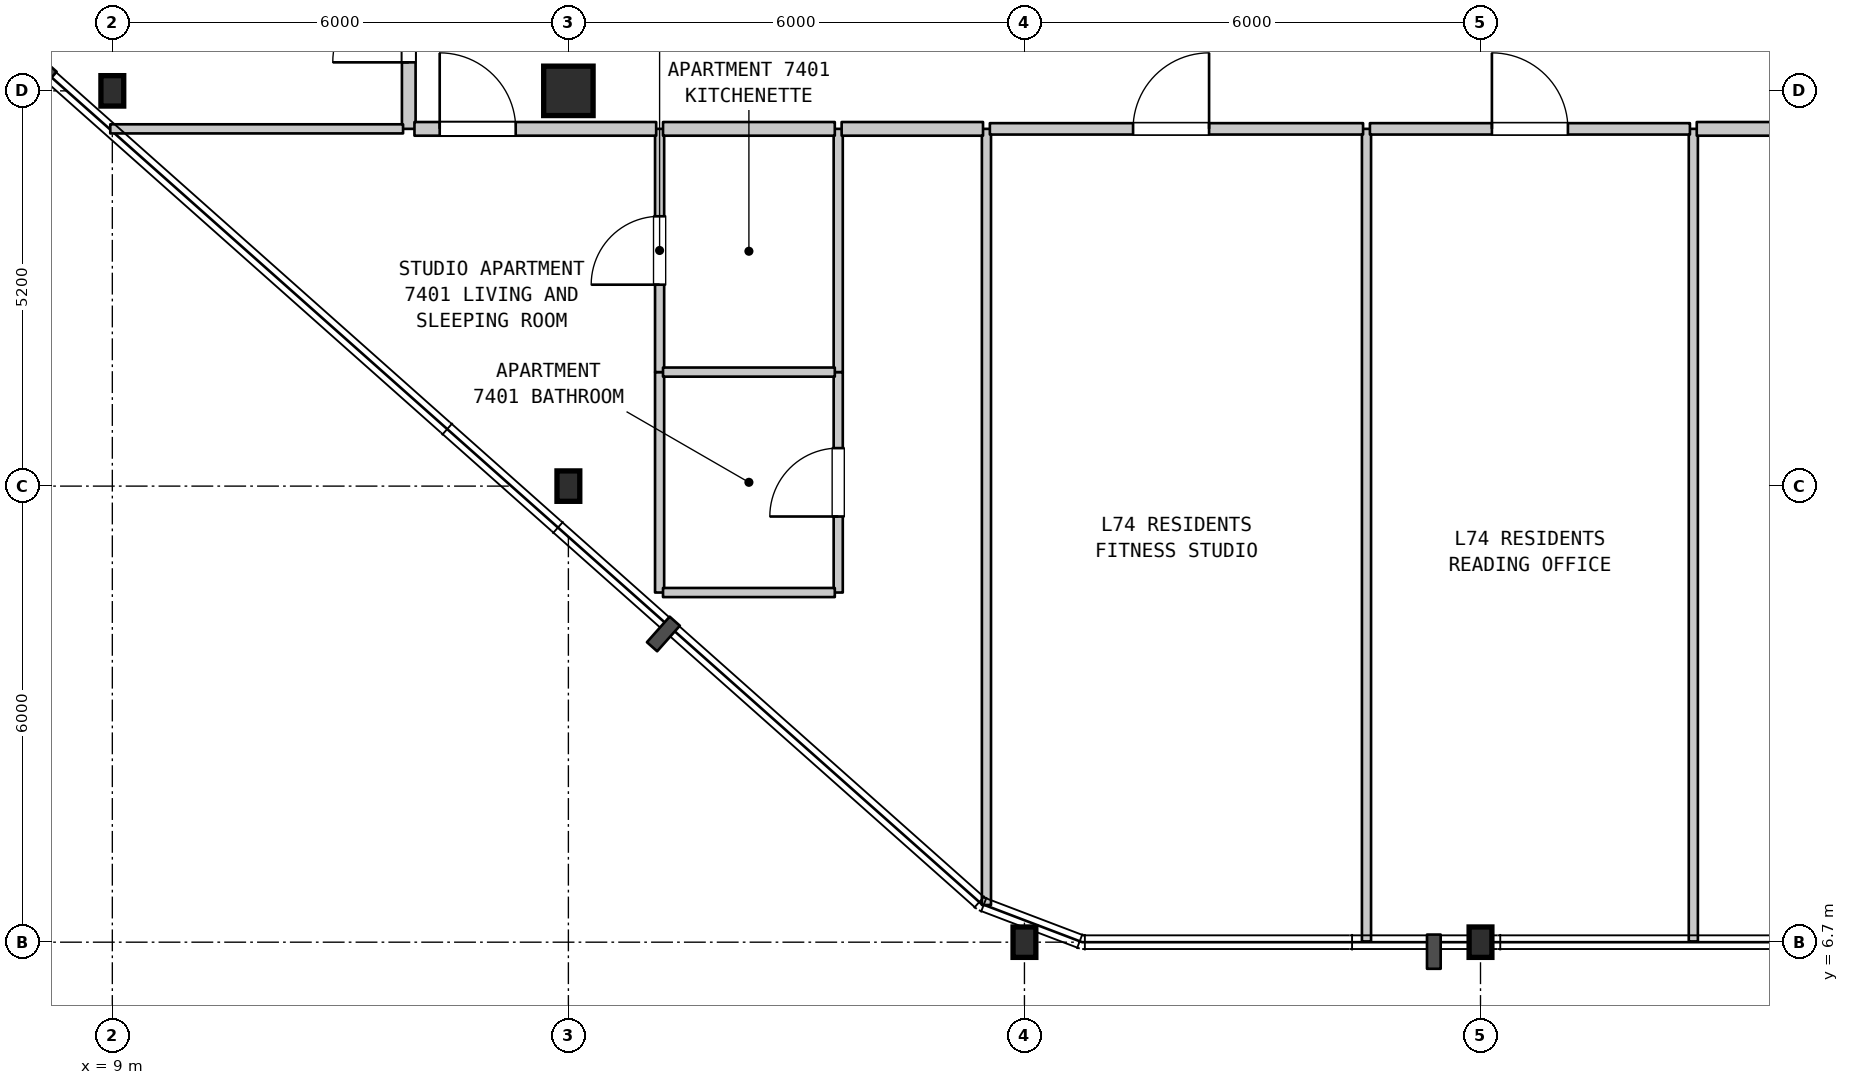
"""IFC4 building model, lengths in metres.
Left out: names, types, materials, properties, quantities, classifications, styles, units other than length and angle.
Written with IfcOpenShell. Run it as: python <this file> out.ifc"""

import sys

from ifc_helpers import new_model, si_unit, direction, frame, frame_2d, origin, origin_2d, place, context, subcontext, project, spatial, rectangle, i_section, extrude, element, fill, save


model = new_model("IFC4")
c1 = context("Model", 3, precision=1e-05, world=origin(), true_north=direction((0.0, 1.0)))
c2 = subcontext(c1, "Body", "Model", "MODEL_VIEW")
j1 = project(units=[si_unit("LENGTHUNIT", "METRE"), si_unit("PLANEANGLEUNIT", "RADIAN")], contexts=[c1])
p1 = place(None, origin())
s1 = spatial("IfcSite", under=j1, at=p1, CompositionType="ELEMENT")
p2 = place(p1, origin())
s2 = spatial("IfcBuilding", under=s1, at=p2, CompositionType="ELEMENT")
p3 = place(p2, frame((0.0, 0.0, 295.4)))
s3 = spatial("IfcBuildingStorey", under=s2, at=p3, CompositionType="ELEMENT", Elevation=295.4)
for number, where, z_axis, x_axis in (
    (1, (9.0, 17.9, 0.0), (0.0, 0.0, 1.0), (1.0, 0.0, 0.0)),
    (2, (15.0, 12.7, 0.0), (0.0, 0.0, 1.0), (1.0, 0.0, 0.0)),
):
    element("IfcColumn", number, at=place(p3, frame(where, z_axis=z_axis, x_axis=x_axis)), inside=s3, PredefinedType="COLUMN", context=c2, shape_type="SweptSolid", body=[
        extrude(i_section(OverallWidth=0.3, OverallDepth=0.4, WebThickness=0.013, FlangeThickness=0.024, FilletRadius=0.027, at=origin_2d()), origin(), (0.0, 0.0, 1.0), 3.7),
    ])
p4 = place(p3, frame((15.0, 17.9, 0.0), z_axis=(0.0, 0.0, 1.0), x_axis=(1.0, 0.0, 0.0)))
e3 = element("IfcColumn", 3, at=p4, inside=s3, PredefinedType="COLUMN", context=c2, shape_type="SweptSolid", body=[
    extrude(rectangle(XDim=0.65, YDim=0.65, at=origin_2d()), origin(), (0.0, 0.0, 1.0), 3.7),
])
for number, where, z_axis, x_axis in (
    (4, (21.0, 6.7, 0.0), (0.0, 0.0, 1.0), (1.0, 0.0, 0.0)),
    (5, (27.0, 6.7, 0.0), (0.0, 0.0, 1.0), (1.0, 0.0, 0.0)),
):
    element("IfcColumn", number, at=place(p3, frame(where, z_axis=z_axis, x_axis=x_axis)), inside=s3, PredefinedType="COLUMN", context=c2, shape_type="SweptSolid", body=[
        extrude(i_section(OverallWidth=0.3, OverallDepth=0.4, WebThickness=0.013, FlangeThickness=0.024, FilletRadius=0.027, at=origin_2d()), origin(), (0.0, 0.0, 1.0), 3.7),
    ])
p5 = place(p3, frame((12.9, 17.4, 0.0), z_axis=(0.0, 0.0, 1.0), x_axis=(0.0, 1.0, 0.0)))
e6 = element("IfcWall", 6, at=p5, inside=s3, PredefinedType="STANDARD", context=c2, shape_type="SweptSolid", body=[
    extrude(rectangle(XDim=2.75, YDim=0.18, at=frame_2d((1.375, 0.0))), origin(), (0.0, 0.0, 1.0), 3.38),
])
p6 = place(p5, frame((0.875, 0.0, 0.0)))
e7 = element("IfcOpeningElement", 7, at=p6, cuts=e6, PredefinedType="OPENING", context=c2, shape_type="SweptSolid", body=[
    extrude(rectangle(XDim=1.0, YDim=2.15, at=frame_2d((0.5, 1.075))), frame((0.0, 0.1, 0.0), z_axis=(0.0, -1.0, 0.0), x_axis=(1.0, 0.0, 0.0)), (0.0, 0.0, 1.0), 0.2),
])
p7 = place(p3, frame((16.2, 11.3, 0.0), z_axis=(0.0, 0.0, 1.0), x_axis=(0.0, 1.0, 0.0)))
e8 = element("IfcWall", 8, at=p7, inside=s3, PredefinedType="PARTITIONING", context=c2, shape_type="SweptSolid", body=[
    extrude(rectangle(XDim=2.9, YDim=0.12, at=frame_2d((1.45, 0.0))), origin(), (0.0, 0.0, 1.0), 3.38),
])
p8 = place(p3, frame((16.2, 14.2, 0.0), z_axis=(0.0, 0.0, 1.0), x_axis=(0.0, 1.0, 0.0)))
e9 = element("IfcWall", 9, at=p8, inside=s3, PredefinedType="PARTITIONING", context=c2, shape_type="SweptSolid", body=[
    extrude(rectangle(XDim=3.2, YDim=0.12, at=frame_2d((1.6, 0.0))), origin(), (0.0, 0.0, 1.0), 3.38),
])
p9 = place(p8, frame((1.15, 0.0, 0.0)))
e10 = element("IfcOpeningElement", 10, at=p9, cuts=e9, PredefinedType="OPENING", context=c2, shape_type="SweptSolid", body=[
    extrude(rectangle(XDim=0.9, YDim=2.15, at=frame_2d((0.45, 1.075))), frame((0.0, 0.07, 0.0), z_axis=(0.0, -1.0, 0.0), x_axis=(1.0, 0.0, 0.0)), (0.0, 0.0, 1.0), 0.14),
])
p10 = place(p3, frame((18.55, 11.3, 0.0), z_axis=(0.0, 0.0, 1.0), x_axis=(0.0, 1.0, 0.0)))
e11 = element("IfcWall", 11, at=p10, inside=s3, PredefinedType="PARTITIONING", context=c2, shape_type="SweptSolid", body=[
    extrude(rectangle(XDim=2.9, YDim=0.12, at=frame_2d((1.45, 0.0))), origin(), (0.0, 0.0, 1.0), 3.38),
])
p11 = place(p10, frame((1.0, 0.0, 0.0)))
e12 = element("IfcOpeningElement", 12, at=p11, cuts=e11, PredefinedType="OPENING", context=c2, shape_type="SweptSolid", body=[
    extrude(rectangle(XDim=0.9, YDim=2.1, at=frame_2d((0.45, 1.05))), frame((0.0, 0.07, 0.0), z_axis=(0.0, -1.0, 0.0), x_axis=(1.0, 0.0, 0.0)), (0.0, 0.0, 1.0), 0.14),
])
p12 = place(p3, frame((18.55, 14.2, 0.0), z_axis=(0.0, 0.0, 1.0), x_axis=(0.0, 1.0, 0.0)))
e13 = element("IfcWall", 13, at=p12, inside=s3, PredefinedType="PARTITIONING", context=c2, shape_type="SweptSolid", body=[
    extrude(rectangle(XDim=3.2, YDim=0.12, at=frame_2d((1.6, 0.0))), origin(), (0.0, 0.0, 1.0), 3.38),
])
p13 = place(p3, frame((20.5, 7.189, 0.0), z_axis=(0.0, 0.0, 1.0), x_axis=(0.0, 1.0, 0.0)))
e14 = element("IfcWall", 14, at=p13, inside=s3, PredefinedType="PARTITIONING", context=c2, shape_type="SweptSolid", body=[
    extrude(rectangle(XDim=10.211, YDim=0.12, at=frame_2d((5.105, 0.0))), origin(), (0.0, 0.0, 1.0), 3.38),
])
for number, where, z_axis, x_axis in (
    (15, (25.5, 6.71, 0.0), (0.0, 0.0, 1.0), (0.0, 1.0, 0.0)),
    (16, (29.8, 6.71, 0.0), (0.0, 0.0, 1.0), (0.0, 1.0, 0.0)),
):
    element("IfcWall", number, at=place(p3, frame(where, z_axis=z_axis, x_axis=x_axis)), inside=s3, PredefinedType="PARTITIONING", context=c2, shape_type="SweptSolid", body=[
        extrude(rectangle(XDim=10.69, YDim=0.12, at=frame_2d((5.345, 0.0))), origin(), (0.0, 0.0, 1.0), 3.38),
    ])
for number, where, z_axis, x_axis in (
    (17, (16.245, 11.3, 0.0), (0.0, 0.0, 1.0), (1.0, 0.0, 0.0)),
    (18, (16.245, 14.2, 0.0), (0.0, 0.0, 1.0), (1.0, 0.0, 0.0)),
):
    element("IfcWall", number, at=place(p3, frame(where, z_axis=z_axis, x_axis=x_axis)), inside=s3, PredefinedType="PARTITIONING", context=c2, shape_type="SweptSolid", body=[
        extrude(rectangle(XDim=2.26, YDim=0.12, at=frame_2d((1.13, 0.0))), origin(), (0.0, 0.0, 1.0), 3.38),
    ])
p14 = place(p3, frame((8.973, 17.4, 0.0), z_axis=(0.0, 0.0, 1.0), x_axis=(1.0, 0.0, 0.0)))
e19 = element("IfcWall", 19, at=p14, inside=s3, PredefinedType="PARTITIONING", context=c2, shape_type="SweptSolid", body=[
    extrude(rectangle(XDim=3.852, YDim=0.12, at=frame_2d((1.926, 0.0))), origin(), (0.0, 0.0, 1.0), 3.38),
])
p15 = place(p3, frame((12.975, 17.4, 0.0), z_axis=(0.0, 0.0, 1.0), x_axis=(1.0, 0.0, 0.0)))
e20 = element("IfcWall", 20, at=p15, inside=s3, PredefinedType="STANDARD", context=c2, shape_type="SweptSolid", body=[
    extrude(rectangle(XDim=3.18, YDim=0.18, at=frame_2d((1.59, 0.0))), origin(), (0.0, 0.0, 1.0), 3.38),
])
p16 = place(p15, frame((0.332, 0.0, 0.0)))
e21 = element("IfcOpeningElement", 21, at=p16, cuts=e20, PredefinedType="OPENING", context=c2, shape_type="SweptSolid", body=[
    extrude(rectangle(XDim=1.0, YDim=2.15, at=frame_2d((0.5, 1.075))), frame((0.0, 0.1, 0.0), z_axis=(0.0, -1.0, 0.0), x_axis=(1.0, 0.0, 0.0)), (0.0, 0.0, 1.0), 0.2),
])
p17 = place(p3, frame((16.245, 17.4, 0.0), z_axis=(0.0, 0.0, 1.0), x_axis=(1.0, 0.0, 0.0)))
e22 = element("IfcWall", 22, at=p17, inside=s3, PredefinedType="STANDARD", context=c2, shape_type="SweptSolid", body=[
    extrude(rectangle(XDim=2.26, YDim=0.18, at=frame_2d((1.13, 0.0))), origin(), (0.0, 0.0, 1.0), 3.38),
])
p18 = place(p3, frame((18.595, 17.4, 0.0), z_axis=(0.0, 0.0, 1.0), x_axis=(1.0, 0.0, 0.0)))
e23 = element("IfcWall", 23, at=p18, inside=s3, PredefinedType="STANDARD", context=c2, shape_type="SweptSolid", body=[
    extrude(rectangle(XDim=1.86, YDim=0.18, at=frame_2d((0.93, 0.0))), origin(), (0.0, 0.0, 1.0), 3.38),
])
p19 = place(p3, frame((20.545, 17.4, 0.0), z_axis=(0.0, 0.0, 1.0), x_axis=(1.0, 0.0, 0.0)))
e24 = element("IfcWall", 24, at=p19, inside=s3, PredefinedType="STANDARD", context=c2, shape_type="SweptSolid", body=[
    extrude(rectangle(XDim=4.91, YDim=0.15, at=frame_2d((2.455, 0.0))), origin(), (0.0, 0.0, 1.0), 3.38),
])
p20 = place(p19, frame((1.884, 0.0, 0.0)))
e25 = element("IfcOpeningElement", 25, at=p20, cuts=e24, PredefinedType="OPENING", context=c2, shape_type="SweptSolid", body=[
    extrude(rectangle(XDim=1.0, YDim=2.15, at=frame_2d((0.5, 1.075))), frame((0.0, 0.085, 0.0), z_axis=(0.0, -1.0, 0.0), x_axis=(1.0, 0.0, 0.0)), (0.0, 0.0, 1.0), 0.17),
])
p21 = place(p3, frame((25.545, 17.4, 0.0), z_axis=(0.0, 0.0, 1.0), x_axis=(1.0, 0.0, 0.0)))
e26 = element("IfcWall", 26, at=p21, inside=s3, PredefinedType="STANDARD", context=c2, shape_type="SweptSolid", body=[
    extrude(rectangle(XDim=4.21, YDim=0.15, at=frame_2d((2.105, 0.0))), origin(), (0.0, 0.0, 1.0), 3.38),
])
p22 = place(p21, frame((1.605, 0.0, 0.0)))
e27 = element("IfcOpeningElement", 27, at=p22, cuts=e26, PredefinedType="OPENING", context=c2, shape_type="SweptSolid", body=[
    extrude(rectangle(XDim=1.0, YDim=2.15, at=frame_2d((0.5, 1.075))), frame((0.0, 0.085, 0.0), z_axis=(0.0, -1.0, 0.0), x_axis=(1.0, 0.0, 0.0)), (0.0, 0.0, 1.0), 0.17),
])
p23 = place(p3, frame((29.845, 17.4, 0.0), z_axis=(0.0, 0.0, 1.0), x_axis=(1.0, 0.0, 0.0)))
e28 = element("IfcWall", 28, at=p23, inside=s3, PredefinedType="STANDARD", context=c2, shape_type="SweptSolid", body=[
    extrude(rectangle(XDim=5.1, YDim=0.18, at=frame_2d((2.55, 0.0))), origin(), (0.0, 0.0, 1.0), 3.38),
])
p24 = place(p23, frame((1.483, 0.0, 0.0)))
e29 = element("IfcOpeningElement", 29, at=p24, cuts=e28, PredefinedType="OPENING", context=c2, shape_type="SweptSolid", body=[
    extrude(rectangle(XDim=1.0, YDim=2.15, at=frame_2d((0.5, 1.075))), frame((0.0, 0.1, 0.0), z_axis=(0.0, -1.0, 0.0), x_axis=(1.0, 0.0, 0.0)), (0.0, 0.0, 1.0), 0.2),
])
p25 = place(p6, origin())
e30 = element("IfcDoor", 30, at=p25, inside=s3, OperationType="SINGLE_SWING_LEFT", PredefinedType="DOOR", context=c2, shape_type="SweptSolid", body=[
    extrude(rectangle(XDim=1.0, YDim=2.15, at=frame_2d((0.5, 1.075))), frame((0.0, 0.025, 0.0), z_axis=(0.0, -1.0, 0.0), x_axis=(1.0, 0.0, 0.0)), (0.0, 0.0, 1.0), 0.05),
])
fill(e7, e30)
p26 = place(p9, origin())
e31 = element("IfcDoor", 31, at=p26, inside=s3, OperationType="SINGLE_SWING_LEFT", PredefinedType="DOOR", context=c2, shape_type="SweptSolid", body=[
    extrude(rectangle(XDim=0.9, YDim=2.15, at=frame_2d((0.45, 1.075))), frame((0.0, 0.025, 0.0), z_axis=(0.0, -1.0, 0.0), x_axis=(1.0, 0.0, 0.0)), (0.0, 0.0, 1.0), 0.05),
])
fill(e10, e31)
p27 = place(p11, origin())
e32 = element("IfcDoor", 32, at=p27, inside=s3, OperationType="SINGLE_SWING_LEFT", PredefinedType="DOOR", context=c2, shape_type="SweptSolid", body=[
    extrude(rectangle(XDim=0.9, YDim=2.1, at=frame_2d((0.45, 1.05))), frame((0.0, 0.025, 0.0), z_axis=(0.0, -1.0, 0.0), x_axis=(1.0, 0.0, 0.0)), (0.0, 0.0, 1.0), 0.05),
])
fill(e12, e32)
p28 = place(p16, origin())
e33 = element("IfcDoor", 33, at=p28, inside=s3, OperationType="SINGLE_SWING_LEFT", PredefinedType="DOOR", context=c2, shape_type="SweptSolid", body=[
    extrude(rectangle(XDim=1.0, YDim=2.15, at=frame_2d((0.5, 1.075))), frame((0.0, 0.025, 0.0), z_axis=(0.0, -1.0, 0.0), x_axis=(1.0, 0.0, 0.0)), (0.0, 0.0, 1.0), 0.05),
])
fill(e21, e33)
p29 = place(p20, origin())
e34 = element("IfcDoor", 34, at=p29, inside=s3, OperationType="SINGLE_SWING_RIGHT", PredefinedType="DOOR", context=c2, shape_type="SweptSolid", body=[
    extrude(rectangle(XDim=1.0, YDim=2.15, at=frame_2d((0.5, 1.075))), frame((0.0, 0.025, 0.0), z_axis=(0.0, -1.0, 0.0), x_axis=(1.0, 0.0, 0.0)), (0.0, 0.0, 1.0), 0.05),
])
fill(e25, e34)
p30 = place(p22, origin())
e35 = element("IfcDoor", 35, at=p30, inside=s3, OperationType="SINGLE_SWING_LEFT", PredefinedType="DOOR", context=c2, shape_type="SweptSolid", body=[
    extrude(rectangle(XDim=1.0, YDim=2.15, at=frame_2d((0.5, 1.075))), frame((0.0, 0.025, 0.0), z_axis=(0.0, -1.0, 0.0), x_axis=(1.0, 0.0, 0.0)), (0.0, 0.0, 1.0), 0.05),
])
fill(e27, e35)
save(model, sys.argv[1])
